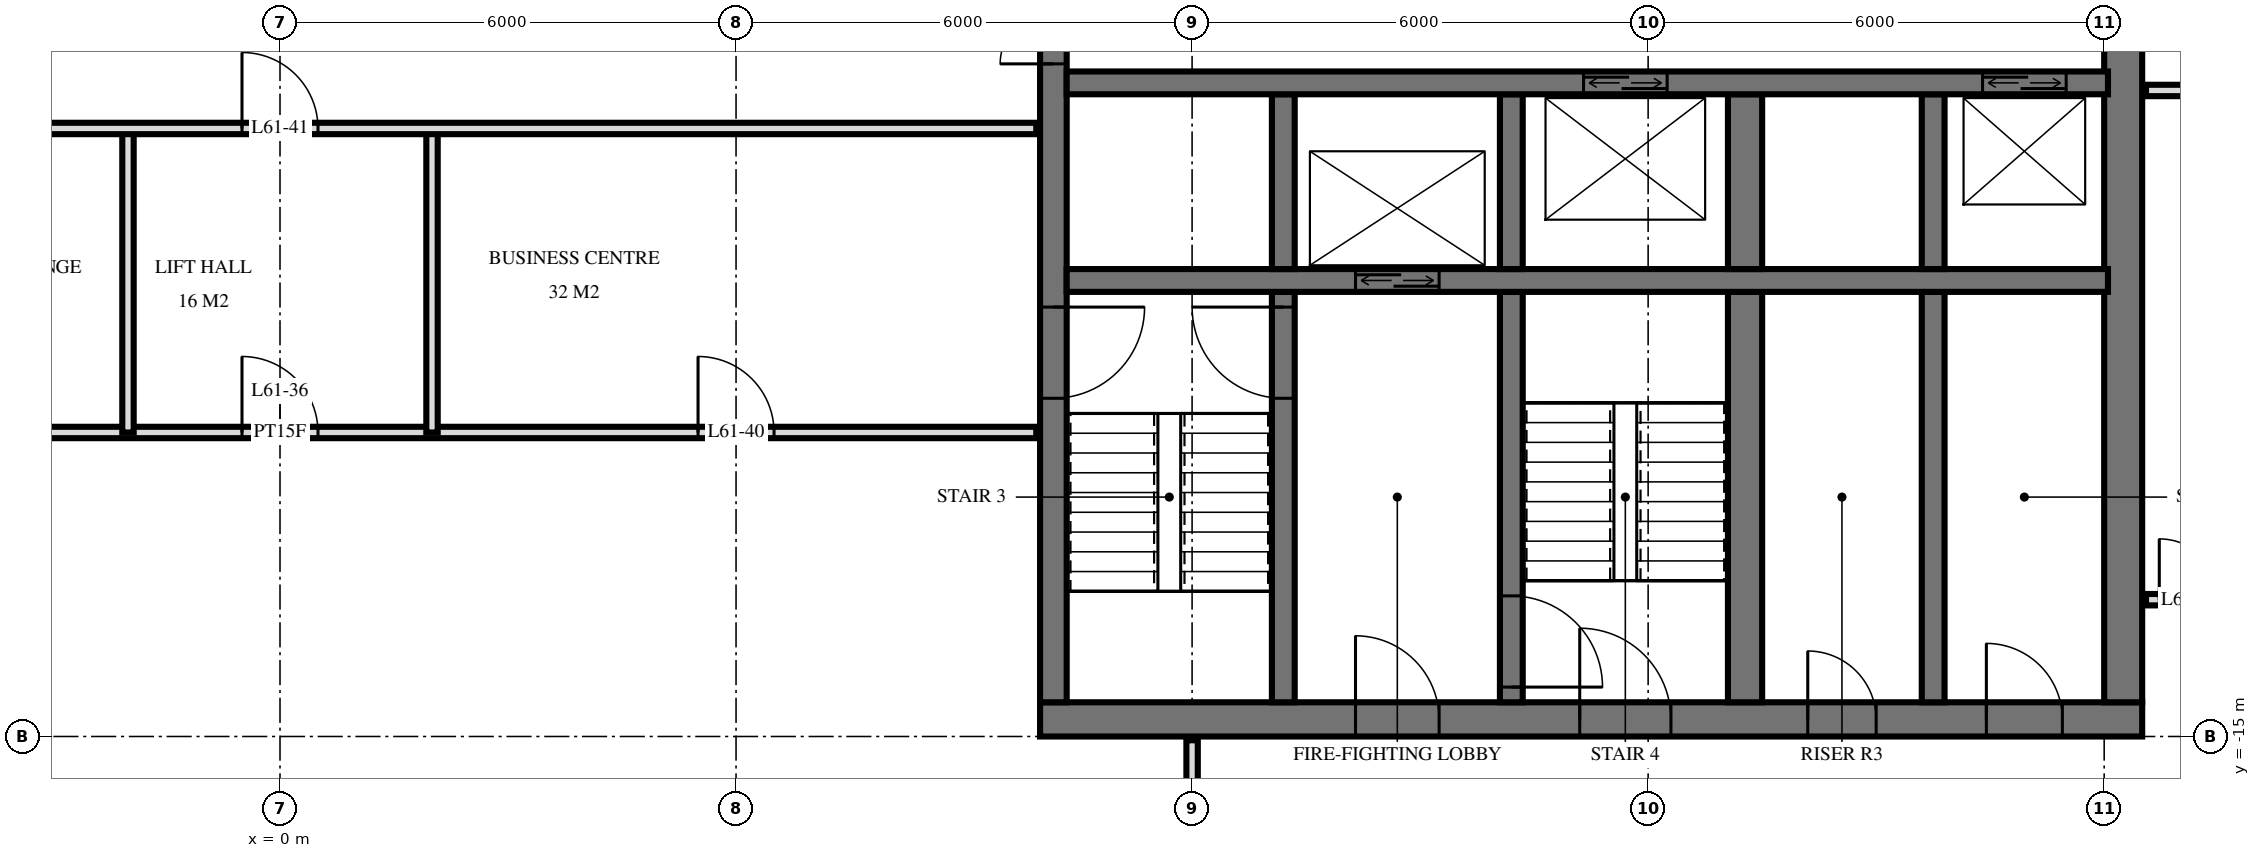
"""IFC4 building model, lengths in metres.
Left out: names, types, materials, properties, quantities, classifications, styles, units other than length and angle.
Written with IfcOpenShell. Run it as: python <this file> out.ifc"""

import sys

from ifc_helpers import new_model, si_unit, direction, frame, frame_2d, origin, place, context, subcontext, project, spatial, rectangle, extrude, element, fill, save


model = new_model("IFC4")
c1 = context("Model", 3, precision=1e-05, world=origin(), true_north=direction((0.0, 1.0)))
c2 = subcontext(c1, "Body", "Model", "MODEL_VIEW")
j1 = project(units=[si_unit("LENGTHUNIT", "METRE"), si_unit("PLANEANGLEUNIT", "RADIAN")], contexts=[c1])
p1 = place(None, origin())
s1 = spatial("IfcSite", under=j1, at=p1, CompositionType="ELEMENT")
p2 = place(p1, origin())
s2 = spatial("IfcBuilding", under=s1, at=p2, CompositionType="ELEMENT")
p3 = place(p2, frame((0.0, 0.0, 232.6)))
s3 = spatial("IfcBuildingStorey", under=s2, at=p3, CompositionType="ELEMENT", Elevation=232.6)
p4 = place(p3, frame((10.0, -14.775, 0.0), z_axis=(0.0, 0.0, 1.0), x_axis=(1.0, 0.0, 0.0)))
e1 = element("IfcWall", 1, at=p4, inside=s3, PredefinedType="SHEAR", context=c2, shape_type="SweptSolid", body=[
    extrude(rectangle(XDim=14.5, YDim=0.45, at=frame_2d((7.25, 0.0))), origin(), (0.0, 0.0, 1.0), 3.5),
])
p5 = place(p4, frame((7.1, 0.0, 0.0)))
e2 = element("IfcOpeningElement", 2, at=p5, cuts=e1, PredefinedType="OPENING", context=c2, shape_type="SweptSolid", body=[
    extrude(rectangle(XDim=1.2, YDim=2.1, at=frame_2d((0.6, 1.05))), frame((0.0, 0.235, 0.0), z_axis=(0.0, -1.0, 0.0), x_axis=(1.0, 0.0, 0.0)), (0.0, 0.0, 1.0), 0.47),
])
p6 = place(p4, frame((4.15, 0.0, 0.0)))
e3 = element("IfcOpeningElement", 3, at=p6, cuts=e1, PredefinedType="OPENING", context=c2, shape_type="SweptSolid", body=[
    extrude(rectangle(XDim=1.1, YDim=2.1, at=frame_2d((0.55, 1.05))), frame((0.0, 0.235, 0.0), z_axis=(0.0, -1.0, 0.0), x_axis=(1.0, 0.0, 0.0)), (0.0, 0.0, 1.0), 0.47),
])
p7 = place(p4, frame((10.1, 0.0, 0.0)))
e4 = element("IfcOpeningElement", 4, at=p7, cuts=e1, PredefinedType="OPENING", context=c2, shape_type="SweptSolid", body=[
    extrude(rectangle(XDim=0.9, YDim=2.1, at=frame_2d((0.45, 1.05))), frame((0.0, 0.235, 0.0), z_axis=(0.0, -1.0, 0.0), x_axis=(1.0, 0.0, 0.0)), (0.0, 0.0, 1.0), 0.47),
])
p8 = place(p4, frame((12.45, 0.0, 0.0)))
e5 = element("IfcOpeningElement", 5, at=p8, cuts=e1, PredefinedType="OPENING", context=c2, shape_type="SweptSolid", body=[
    extrude(rectangle(XDim=1.0, YDim=2.1, at=frame_2d((0.5, 1.05))), frame((0.0, 0.235, 0.0), z_axis=(0.0, -1.0, 0.0), x_axis=(1.0, 0.0, 0.0)), (0.0, 0.0, 1.0), 0.47),
])
p9 = place(p3, frame((10.175, -14.55, 0.0), z_axis=(0.0, 0.0, 1.0), x_axis=(0.0, 1.0, 0.0)))
e6 = element("IfcWall", 6, at=p9, inside=s3, PredefinedType="SHEAR", context=c2, shape_type="SweptSolid", body=[
    extrude(rectangle(XDim=14.1, YDim=0.35, at=frame_2d((7.05, 0.0))), origin(), (0.0, 0.0, 1.0), 3.5),
])
p10 = place(p9, frame((8.4, 0.0, 0.0)))
e7 = element("IfcOpeningElement", 7, at=p10, cuts=e6, PredefinedType="OPENING", context=c2, shape_type="SweptSolid", body=[
    extrude(rectangle(XDim=1.4, YDim=2.4, at=frame_2d((0.7, 1.2))), frame((0.0, 0.185, 0.0), z_axis=(0.0, -1.0, 0.0), x_axis=(1.0, 0.0, 0.0)), (0.0, 0.0, 1.0), 0.37),
])
p11 = place(p9, frame((10.0, 0.0, 0.0)))
e8 = element("IfcOpeningElement", 8, at=p11, cuts=e6, PredefinedType="OPENING", context=c2, shape_type="SweptSolid", body=[
    extrude(rectangle(XDim=1.4, YDim=2.4, at=frame_2d((0.7, 1.2))), frame((0.0, 0.185, 0.0), z_axis=(0.0, -1.0, 0.0), x_axis=(1.0, 0.0, 0.0)), (0.0, 0.0, 1.0), 0.37),
])
p12 = place(p9, frame((4.0, 0.0, 0.0)))
e9 = element("IfcOpeningElement", 9, at=p12, cuts=e6, PredefinedType="OPENING", context=c2, shape_type="SweptSolid", body=[
    extrude(rectangle(XDim=1.2, YDim=2.1, at=frame_2d((0.6, 1.05))), frame((0.0, 0.185, 0.0), z_axis=(0.0, -1.0, 0.0), x_axis=(1.0, 0.0, 0.0)), (0.0, 0.0, 1.0), 0.37),
])
p13 = place(p3, frame((24.25, -14.55, 0.0), z_axis=(0.0, 0.0, 1.0), x_axis=(0.0, 1.0, 0.0)))
e10 = element("IfcWall", 10, at=p13, inside=s3, PredefinedType="SHEAR", context=c2, shape_type="SweptSolid", body=[
    extrude(rectangle(XDim=14.1, YDim=0.5, at=frame_2d((7.05, 0.0))), origin(), (0.0, 0.0, 1.0), 3.5),
])
p14 = place(p3, frame((10.35, -6.4, 0.0), z_axis=(0.0, 0.0, 1.0), x_axis=(1.0, 0.0, 0.0)))
e11 = element("IfcWall", 11, at=p14, inside=s3, PredefinedType="SHEAR", context=c2, shape_type="SweptSolid", body=[
    extrude(rectangle(XDim=13.7, YDim=0.3, at=frame_2d((6.85, 0.0))), origin(), (0.0, 0.0, 1.0), 3.5),
])
p15 = place(p14, frame((12.05, 0.0, 0.0)))
e12 = element("IfcOpeningElement", 12, at=p15, cuts=e11, PredefinedType="OPENING", context=c2, shape_type="SweptSolid", body=[
    extrude(rectangle(XDim=1.1, YDim=2.1, at=frame_2d((0.55, 1.05))), frame((0.0, 0.16, 0.0), z_axis=(0.0, -1.0, 0.0), x_axis=(1.0, 0.0, 0.0)), (0.0, 0.0, 1.0), 0.32),
])
p16 = place(p14, frame((6.8, 0.0, 0.0)))
e13 = element("IfcOpeningElement", 13, at=p16, cuts=e11, PredefinedType="OPENING", context=c2, shape_type="SweptSolid", body=[
    extrude(rectangle(XDim=1.1, YDim=2.1, at=frame_2d((0.55, 1.05))), frame((0.0, 0.16, 0.0), z_axis=(0.0, -1.0, 0.0), x_axis=(1.0, 0.0, 0.0)), (0.0, 0.0, 1.0), 0.32),
])
p17 = place(p3, frame((10.35, -9.0, 0.0), z_axis=(0.0, 0.0, 1.0), x_axis=(1.0, 0.0, 0.0)))
e14 = element("IfcWall", 14, at=p17, inside=s3, PredefinedType="SHEAR", context=c2, shape_type="SweptSolid", body=[
    extrude(rectangle(XDim=13.7, YDim=0.3, at=frame_2d((6.85, 0.0))), origin(), (0.0, 0.0, 1.0), 3.5),
])
p18 = place(p17, frame((3.8, 0.0, 0.0)))
e15 = element("IfcOpeningElement", 15, at=p18, cuts=e14, PredefinedType="OPENING", context=c2, shape_type="SweptSolid", body=[
    extrude(rectangle(XDim=1.1, YDim=2.1, at=frame_2d((0.55, 1.05))), frame((0.0, 0.16, 0.0), z_axis=(0.0, -1.0, 0.0), x_axis=(1.0, 0.0, 0.0)), (0.0, 0.0, 1.0), 0.32),
])
p19 = place(p3, frame((13.2, -8.85, 0.0), z_axis=(0.0, 0.0, 1.0), x_axis=(0.0, 1.0, 0.0)))
e16 = element("IfcWall", 16, at=p19, inside=s3, PredefinedType="SHEAR", context=c2, shape_type="SweptSolid", body=[
    extrude(rectangle(XDim=2.3, YDim=0.3, at=frame_2d((1.15, 0.0))), origin(), (0.0, 0.0, 1.0), 3.5),
])
p20 = place(p3, frame((13.2, -14.55, 0.0), z_axis=(0.0, 0.0, 1.0), x_axis=(0.0, 1.0, 0.0)))
e17 = element("IfcWall", 17, at=p20, inside=s3, PredefinedType="SHEAR", context=c2, shape_type="SweptSolid", body=[
    extrude(rectangle(XDim=5.4, YDim=0.3, at=frame_2d((2.7, 0.0))), origin(), (0.0, 0.0, 1.0), 3.5),
])
p21 = place(p20, frame((4.0, 0.0, 0.0)))
e18 = element("IfcOpeningElement", 18, at=p21, cuts=e17, PredefinedType="OPENING", context=c2, shape_type="SweptSolid", body=[
    extrude(rectangle(XDim=1.2, YDim=2.1, at=frame_2d((0.6, 1.05))), frame((0.0, 0.16, 0.0), z_axis=(0.0, -1.0, 0.0), x_axis=(1.0, 0.0, 0.0)), (0.0, 0.0, 1.0), 0.32),
])
p22 = place(p3, frame((16.2, -8.85, 0.0), z_axis=(0.0, 0.0, 1.0), x_axis=(0.0, 1.0, 0.0)))
e19 = element("IfcWall", 19, at=p22, inside=s3, PredefinedType="SHEAR", context=c2, shape_type="SweptSolid", body=[
    extrude(rectangle(XDim=2.3, YDim=0.3, at=frame_2d((1.15, 0.0))), origin(), (0.0, 0.0, 1.0), 3.5),
])
p23 = place(p3, frame((16.2, -14.55, 0.0), z_axis=(0.0, 0.0, 1.0), x_axis=(0.0, 1.0, 0.0)))
e20 = element("IfcWall", 20, at=p23, inside=s3, PredefinedType="SHEAR", context=c2, shape_type="SweptSolid", body=[
    extrude(rectangle(XDim=5.4, YDim=0.3, at=frame_2d((2.7, 0.0))), origin(), (0.0, 0.0, 1.0), 3.5),
])
p24 = place(p23, frame((0.2, 0.0, 0.0)))
e21 = element("IfcOpeningElement", 21, at=p24, cuts=e20, PredefinedType="OPENING", context=c2, shape_type="SweptSolid", body=[
    extrude(rectangle(XDim=1.2, YDim=2.1, at=frame_2d((0.6, 1.05))), frame((0.0, 0.16, 0.0), z_axis=(0.0, -1.0, 0.0), x_axis=(1.0, 0.0, 0.0)), (0.0, 0.0, 1.0), 0.32),
])
p25 = place(p3, frame((19.275, -8.85, 0.0), z_axis=(0.0, 0.0, 1.0), x_axis=(0.0, 1.0, 0.0)))
e22 = element("IfcWall", 22, at=p25, inside=s3, PredefinedType="SHEAR", context=c2, shape_type="SweptSolid", body=[
    extrude(rectangle(XDim=2.3, YDim=0.45, at=frame_2d((1.15, 0.0))), origin(), (0.0, 0.0, 1.0), 3.5),
])
p26 = place(p3, frame((19.275, -14.55, 0.0), z_axis=(0.0, 0.0, 1.0), x_axis=(0.0, 1.0, 0.0)))
e23 = element("IfcWall", 23, at=p26, inside=s3, PredefinedType="SHEAR", context=c2, shape_type="SweptSolid", body=[
    extrude(rectangle(XDim=5.4, YDim=0.45, at=frame_2d((2.7, 0.0))), origin(), (0.0, 0.0, 1.0), 3.5),
])
p27 = place(p3, frame((21.75, -8.85, 0.0), z_axis=(0.0, 0.0, 1.0), x_axis=(0.0, 1.0, 0.0)))
e24 = element("IfcWall", 24, at=p27, inside=s3, PredefinedType="SHEAR", context=c2, shape_type="SweptSolid", body=[
    extrude(rectangle(XDim=2.3, YDim=0.3, at=frame_2d((1.15, 0.0))), origin(), (0.0, 0.0, 1.0), 3.5),
])
p28 = place(p3, frame((21.75, -14.55, 0.0), z_axis=(0.0, 0.0, 1.0), x_axis=(0.0, 1.0, 0.0)))
e25 = element("IfcWall", 25, at=p28, inside=s3, PredefinedType="SHEAR", context=c2, shape_type="SweptSolid", body=[
    extrude(rectangle(XDim=5.4, YDim=0.3, at=frame_2d((2.7, 0.0))), origin(), (0.0, 0.0, 1.0), 3.5),
])
p29 = place(p3, frame((12.0, -18.0, 0.0), z_axis=(0.0, 0.0, 1.0), x_axis=(0.0, 1.0, 0.0)))
e26 = element("IfcWall", 26, at=p29, inside=s3, PredefinedType="PARTITIONING", context=c2, shape_type="SweptSolid", body=[
    extrude(rectangle(XDim=2.95, YDim=0.15, at=frame_2d((1.475, 0.0))), origin(), (0.0, 0.0, 1.0), 3.22),
])
p30 = place(p29, frame((1.0, 0.0, 0.0)))
e27 = element("IfcOpeningElement", 27, at=p30, cuts=e26, PredefinedType="OPENING", context=c2, shape_type="SweptSolid", body=[
    extrude(rectangle(XDim=1.0, YDim=2.1, at=frame_2d((0.5, 1.05))), frame((0.0, 0.085, 0.0), z_axis=(0.0, -1.0, 0.0), x_axis=(1.0, 0.0, 0.0)), (0.0, 0.0, 1.0), 0.17),
])
for number, where, z_axis, x_axis in (
    (28, (2.0, -11.0, 0.0), (0.0, 0.0, 1.0), (0.0, 1.0, 0.0)),
    (29, (-2.0, -11.0, 0.0), (0.0, 0.0, 1.0), (0.0, 1.0, 0.0)),
):
    element("IfcWall", number, at=place(p3, frame(where, z_axis=z_axis, x_axis=x_axis)), inside=s3, PredefinedType="PARTITIONING", context=c2, shape_type="SweptSolid", body=[
        extrude(rectangle(XDim=4.0, YDim=0.15, at=frame_2d((2.0, 0.0))), origin(), (0.0, 0.0, 1.0), 3.22),
    ])
p31 = place(p3, frame((24.55, -13.2, 0.0), z_axis=(0.0, 0.0, 1.0), x_axis=(1.0, 0.0, 0.0)))
e30 = element("IfcWall", 30, at=p31, inside=s3, PredefinedType="PARTITIONING", context=c2, shape_type="SweptSolid", body=[
    extrude(rectangle(XDim=1.15, YDim=0.15, at=frame_2d((0.575, 0.0))), origin(), (0.0, 0.0, 1.0), 3.22),
])
p32 = place(p31, frame((0.175, 0.0, 0.0)))
e31 = element("IfcOpeningElement", 31, at=p32, cuts=e30, PredefinedType="OPENING", context=c2, shape_type="SweptSolid", body=[
    extrude(rectangle(XDim=0.8, YDim=2.1, at=frame_2d((0.4, 1.05))), frame((0.0, 0.085, 0.0), z_axis=(0.0, -1.0, 0.0), x_axis=(1.0, 0.0, 0.0)), (0.0, 0.0, 1.0), 0.17),
])
p33 = place(p3, frame((-9.95, -11.0, 0.0), z_axis=(0.0, 0.0, 1.0), x_axis=(1.0, 0.0, 0.0)))
e32 = element("IfcWall", 32, at=p33, inside=s3, PredefinedType="PARTITIONING", context=c2, shape_type="SweptSolid", body=[
    extrude(rectangle(XDim=19.9, YDim=0.15, at=frame_2d((9.95, 0.0))), origin(), (0.0, 0.0, 1.0), 3.22),
])
p34 = place(p33, frame((9.45, 0.0, 0.0)))
e33 = element("IfcOpeningElement", 33, at=p34, cuts=e32, PredefinedType="OPENING", context=c2, shape_type="SweptSolid", body=[
    extrude(rectangle(XDim=1.0, YDim=2.1, at=frame_2d((0.5, 1.05))), frame((0.0, 0.085, 0.0), z_axis=(0.0, -1.0, 0.0), x_axis=(1.0, 0.0, 0.0)), (0.0, 0.0, 1.0), 0.17),
])
p35 = place(p33, frame((15.45, 0.0, 0.0)))
e34 = element("IfcOpeningElement", 34, at=p35, cuts=e32, PredefinedType="OPENING", context=c2, shape_type="SweptSolid", body=[
    extrude(rectangle(XDim=1.0, YDim=2.1, at=frame_2d((0.5, 1.05))), frame((0.0, 0.085, 0.0), z_axis=(0.0, -1.0, 0.0), x_axis=(1.0, 0.0, 0.0)), (0.0, 0.0, 1.0), 0.17),
])
p36 = place(p3, frame((-9.95, -7.0, 0.0), z_axis=(0.0, 0.0, 1.0), x_axis=(1.0, 0.0, 0.0)))
e35 = element("IfcWall", 35, at=p36, inside=s3, PredefinedType="PARTITIONING", context=c2, shape_type="SweptSolid", body=[
    extrude(rectangle(XDim=19.9, YDim=0.15, at=frame_2d((9.95, 0.0))), origin(), (0.0, 0.0, 1.0), 3.22),
])
p37 = place(p36, frame((9.45, 0.0, 0.0)))
e36 = element("IfcOpeningElement", 36, at=p37, cuts=e35, PredefinedType="OPENING", context=c2, shape_type="SweptSolid", body=[
    extrude(rectangle(XDim=1.0, YDim=2.1, at=frame_2d((0.5, 1.05))), frame((0.0, 0.085, 0.0), z_axis=(0.0, -1.0, 0.0), x_axis=(1.0, 0.0, 0.0)), (0.0, 0.0, 1.0), 0.17),
])
p38 = place(p36, frame((3.45, 0.0, 0.0)))
e37 = element("IfcOpeningElement", 37, at=p38, cuts=e35, PredefinedType="OPENING", context=c2, shape_type="SweptSolid", body=[
    extrude(rectangle(XDim=1.0, YDim=2.1, at=frame_2d((0.5, 1.05))), frame((0.0, 0.085, 0.0), z_axis=(0.0, -1.0, 0.0), x_axis=(1.0, 0.0, 0.0)), (0.0, 0.0, 1.0), 0.17),
])
p39 = place(p3, frame((24.55, -6.5, 0.0), z_axis=(0.0, 0.0, 1.0), x_axis=(1.0, 0.0, 0.0)))
e38 = element("IfcWall", 38, at=p39, inside=s3, PredefinedType="PLUMBINGWALL", context=c2, shape_type="SweptSolid", body=[
    extrude(rectangle(XDim=2.27, YDim=0.15, at=frame_2d((1.135, 0.0))), origin(), (0.0, 0.0, 1.0), 3.22),
])
p40 = place(p39, frame((0.75, 0.0, 0.0)))
e39 = element("IfcOpeningElement", 39, at=p40, cuts=e38, PredefinedType="OPENING", context=c2, shape_type="SweptSolid", body=[
    extrude(rectangle(XDim=0.9, YDim=2.1, at=frame_2d((0.45, 1.05))), frame((0.0, 0.085, 0.0), z_axis=(0.0, -1.0, 0.0), x_axis=(1.0, 0.0, 0.0)), (0.0, 0.0, 1.0), 0.17),
])
p41 = place(p15, origin())
e40 = element("IfcDoor", 40, at=p41, inside=s3, OperationType="DOUBLE_DOOR_SLIDING", PredefinedType="USERDEFINED", context=c2, shape_type="SweptSolid", body=[
    extrude(rectangle(XDim=1.1, YDim=2.1, at=frame_2d((0.55, 1.05))), frame((0.0, 0.025, 0.0), z_axis=(0.0, -1.0, 0.0), x_axis=(1.0, 0.0, 0.0)), (0.0, 0.0, 1.0), 0.05),
])
fill(e12, e40)
p42 = place(p18, origin())
e41 = element("IfcDoor", 41, at=p42, inside=s3, OperationType="DOUBLE_DOOR_SLIDING", PredefinedType="USERDEFINED", context=c2, shape_type="SweptSolid", body=[
    extrude(rectangle(XDim=1.1, YDim=2.1, at=frame_2d((0.55, 1.05))), frame((0.0, 0.025, 0.0), z_axis=(0.0, -1.0, 0.0), x_axis=(1.0, 0.0, 0.0)), (0.0, 0.0, 1.0), 0.05),
])
fill(e15, e41)
p43 = place(p16, origin())
e42 = element("IfcDoor", 42, at=p43, inside=s3, OperationType="DOUBLE_DOOR_SLIDING", PredefinedType="USERDEFINED", context=c2, shape_type="SweptSolid", body=[
    extrude(rectangle(XDim=1.1, YDim=2.1, at=frame_2d((0.55, 1.05))), frame((0.0, 0.025, 0.0), z_axis=(0.0, -1.0, 0.0), x_axis=(1.0, 0.0, 0.0)), (0.0, 0.0, 1.0), 0.05),
])
fill(e13, e42)
p44 = place(p10, origin())
e43 = element("IfcDoor", 43, at=p44, inside=s3, OperationType="DOUBLE_DOOR_SINGLE_SWING", PredefinedType="DOOR", context=c2, shape_type="SweptSolid", body=[
    extrude(rectangle(XDim=1.4, YDim=2.4, at=frame_2d((0.7, 1.2))), frame((0.0, 0.025, 0.0), z_axis=(0.0, -1.0, 0.0), x_axis=(1.0, 0.0, 0.0)), (0.0, 0.0, 1.0), 0.05),
])
fill(e7, e43)
p45 = place(p12, frame((0.6, 0.0, 0.0), z_axis=(0.0, 0.0, 1.0), x_axis=(-1.0, 0.0, 0.0)))
e44 = element("IfcDoor", 44, at=p45, inside=s3, OperationType="SINGLE_SWING_RIGHT", PredefinedType="DOOR", context=c2, shape_type="SweptSolid", body=[
    extrude(rectangle(XDim=1.2, YDim=2.1, at=frame_2d((0.0, 1.05))), frame((0.0, -0.025, 0.0), z_axis=(0.0, 1.0, 0.0), x_axis=(-1.0, 0.0, 0.0)), (0.0, 0.0, 1.0), 0.05),
])
fill(e9, e44)
p46 = place(p5, origin())
e45 = element("IfcDoor", 45, at=p46, inside=s3, OperationType="SINGLE_SWING_RIGHT", PredefinedType="DOOR", context=c2, shape_type="SweptSolid", body=[
    extrude(rectangle(XDim=1.2, YDim=2.1, at=frame_2d((0.6, 1.05))), frame((0.0, 0.025, 0.0), z_axis=(0.0, -1.0, 0.0), x_axis=(1.0, 0.0, 0.0)), (0.0, 0.0, 1.0), 0.05),
])
fill(e2, e45)
p47 = place(p6, origin())
e46 = element("IfcDoor", 46, at=p47, inside=s3, OperationType="SINGLE_SWING_RIGHT", PredefinedType="DOOR", context=c2, shape_type="SweptSolid", body=[
    extrude(rectangle(XDim=1.1, YDim=2.1, at=frame_2d((0.55, 1.05))), frame((0.0, 0.025, 0.0), z_axis=(0.0, -1.0, 0.0), x_axis=(1.0, 0.0, 0.0)), (0.0, 0.0, 1.0), 0.05),
])
fill(e3, e46)
p48 = place(p7, origin())
e47 = element("IfcDoor", 47, at=p48, inside=s3, OperationType="SINGLE_SWING_RIGHT", PredefinedType="DOOR", context=c2, shape_type="SweptSolid", body=[
    extrude(rectangle(XDim=0.9, YDim=2.1, at=frame_2d((0.45, 1.05))), frame((0.0, 0.025, 0.0), z_axis=(0.0, -1.0, 0.0), x_axis=(1.0, 0.0, 0.0)), (0.0, 0.0, 1.0), 0.05),
])
fill(e4, e47)
p49 = place(p8, origin())
e48 = element("IfcDoor", 48, at=p49, inside=s3, OperationType="SINGLE_SWING_RIGHT", PredefinedType="DOOR", context=c2, shape_type="SweptSolid", body=[
    extrude(rectangle(XDim=1.0, YDim=2.1, at=frame_2d((0.5, 1.05))), frame((0.0, 0.025, 0.0), z_axis=(0.0, -1.0, 0.0), x_axis=(1.0, 0.0, 0.0)), (0.0, 0.0, 1.0), 0.05),
])
fill(e5, e48)
p50 = place(p21, origin())
e49 = element("IfcDoor", 49, at=p50, inside=s3, OperationType="SINGLE_SWING_LEFT", PredefinedType="DOOR", context=c2, shape_type="SweptSolid", body=[
    extrude(rectangle(XDim=1.2, YDim=2.1, at=frame_2d((0.6, 1.05))), frame((0.0, 0.025, 0.0), z_axis=(0.0, -1.0, 0.0), x_axis=(1.0, 0.0, 0.0)), (0.0, 0.0, 1.0), 0.05),
])
fill(e18, e49)
p51 = place(p24, frame((0.6, 0.0, 0.0), z_axis=(0.0, 0.0, 1.0), x_axis=(-1.0, 0.0, 0.0)))
e50 = element("IfcDoor", 50, at=p51, inside=s3, OperationType="SINGLE_SWING_LEFT", PredefinedType="DOOR", context=c2, shape_type="SweptSolid", body=[
    extrude(rectangle(XDim=1.2, YDim=2.1, at=frame_2d((0.0, 1.05))), frame((0.0, -0.025, 0.0), z_axis=(0.0, 1.0, 0.0), x_axis=(-1.0, 0.0, 0.0)), (0.0, 0.0, 1.0), 0.05),
])
fill(e21, e50)
p52 = place(p32, origin())
e51 = element("IfcDoor", 51, at=p52, inside=s3, OperationType="SINGLE_SWING_RIGHT", PredefinedType="DOOR", context=c2, shape_type="SweptSolid", body=[
    extrude(rectangle(XDim=0.8, YDim=2.1, at=frame_2d((0.4, 1.05))), frame((0.0, 0.025, 0.0), z_axis=(0.0, -1.0, 0.0), x_axis=(1.0, 0.0, 0.0)), (0.0, 0.0, 1.0), 0.05),
])
fill(e31, e51)
p53 = place(p34, origin())
e52 = element("IfcDoor", 52, at=p53, inside=s3, OperationType="SINGLE_SWING_RIGHT", PredefinedType="DOOR", context=c2, shape_type="SweptSolid", body=[
    extrude(rectangle(XDim=1.0, YDim=2.1, at=frame_2d((0.5, 1.05))), frame((0.0, 0.025, 0.0), z_axis=(0.0, -1.0, 0.0), x_axis=(1.0, 0.0, 0.0)), (0.0, 0.0, 1.0), 0.05),
])
fill(e33, e52)
p54 = place(p35, origin())
e53 = element("IfcDoor", 53, at=p54, inside=s3, OperationType="SINGLE_SWING_RIGHT", PredefinedType="DOOR", context=c2, shape_type="SweptSolid", body=[
    extrude(rectangle(XDim=1.0, YDim=2.1, at=frame_2d((0.5, 1.05))), frame((0.0, 0.025, 0.0), z_axis=(0.0, -1.0, 0.0), x_axis=(1.0, 0.0, 0.0)), (0.0, 0.0, 1.0), 0.05),
])
fill(e34, e53)
p55 = place(p37, origin())
e54 = element("IfcDoor", 54, at=p55, inside=s3, OperationType="SINGLE_SWING_RIGHT", PredefinedType="DOOR", context=c2, shape_type="SweptSolid", body=[
    extrude(rectangle(XDim=1.0, YDim=2.1, at=frame_2d((0.5, 1.05))), frame((0.0, 0.025, 0.0), z_axis=(0.0, -1.0, 0.0), x_axis=(1.0, 0.0, 0.0)), (0.0, 0.0, 1.0), 0.05),
])
fill(e36, e54)
save(model, sys.argv[1])
